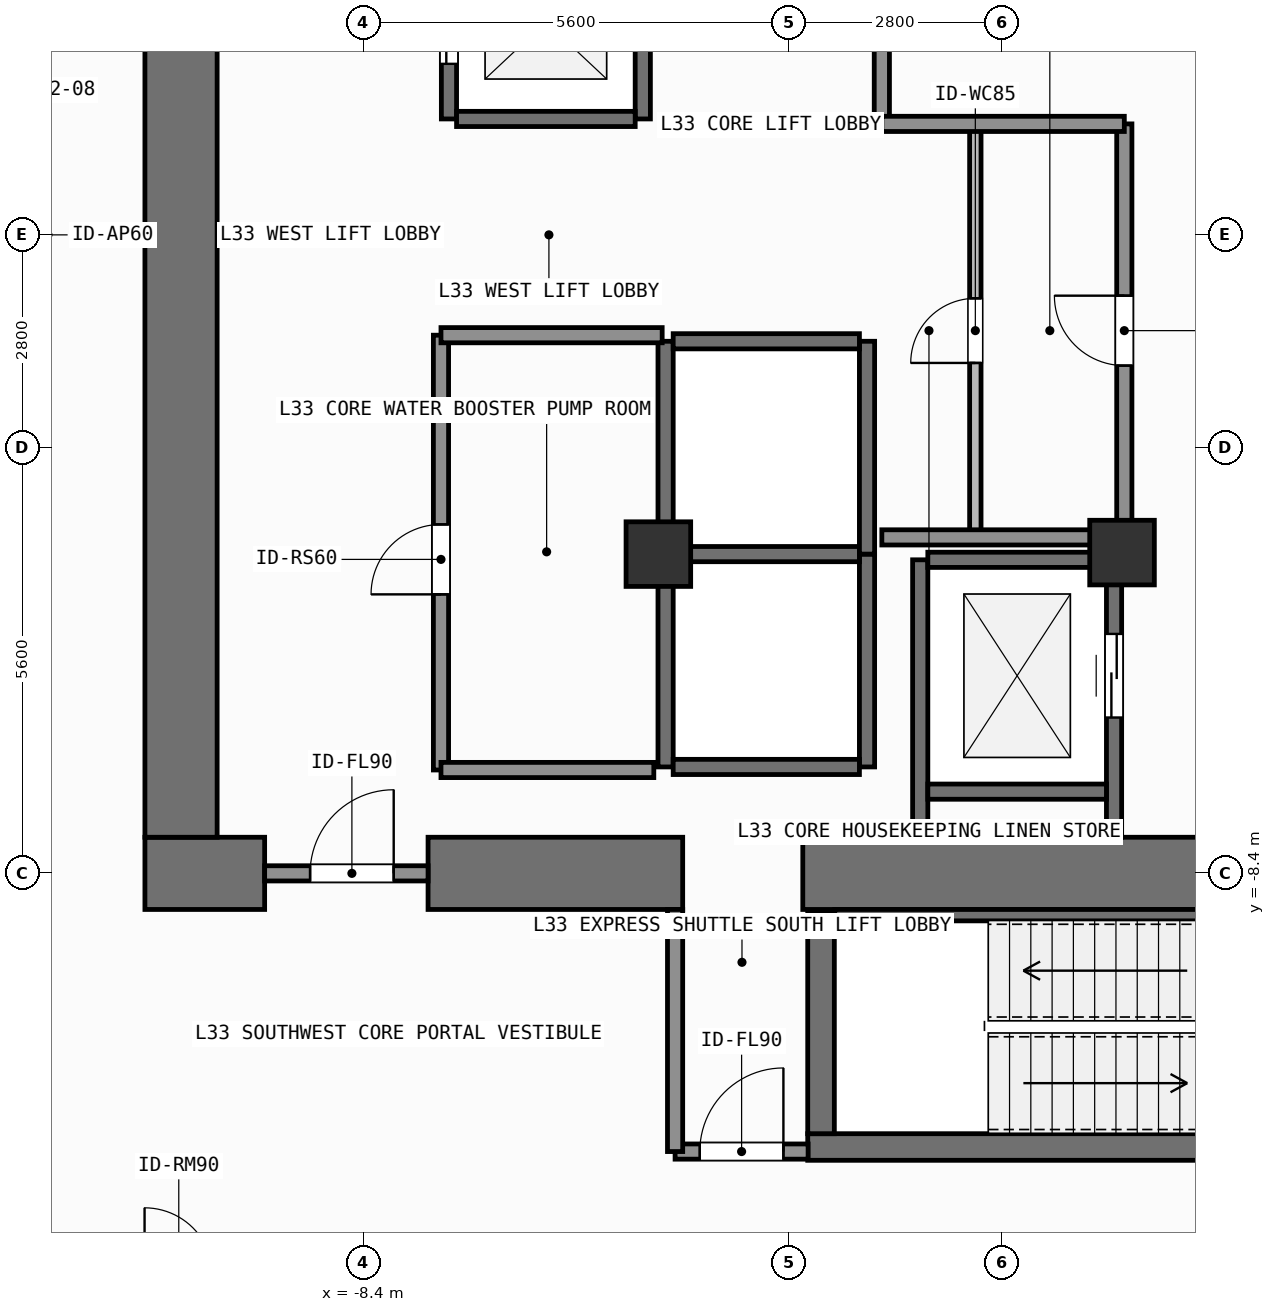
"""IFC4 building model, lengths in metres.
Left out: names, types, materials, properties, quantities, classifications, styles, units other than length and angle.
Written with IfcOpenShell. Run it as: python <this file> out.ifc"""

import sys

from ifc_helpers import new_model, si_unit, direction, frame, frame_2d, origin, origin_2d, place, context, subcontext, project, spatial, rectangle, extrude, element, fill, save


model = new_model("IFC4")
c1 = context("Model", 3, precision=1e-05, world=origin(), true_north=direction((0.0, 1.0)))
c2 = subcontext(c1, "Body", "Model", "MODEL_VIEW")
j1 = project(units=[si_unit("LENGTHUNIT", "METRE"), si_unit("PLANEANGLEUNIT", "RADIAN")], contexts=[c1])
p1 = place(None, origin())
s1 = spatial("IfcSite", under=j1, at=p1, CompositionType="ELEMENT")
p2 = place(p1, origin())
s2 = spatial("IfcBuilding", under=s1, at=p2, CompositionType="ELEMENT")
p3 = place(p2, frame((0.0, 0.0, 132.9)))
s3 = spatial("IfcBuildingStorey", under=s2, at=p3, CompositionType="ELEMENT", Elevation=132.9)
p4 = place(p3, frame((-11.275, -8.4, 0.0), z_axis=(0.0, 0.0, 1.0), x_axis=(1.0, 0.0, 0.0)))
e1 = element("IfcWall", 1, at=p4, inside=s3, PredefinedType="SHEAR", context=c2, shape_type="SweptSolid", body=[
    extrude(rectangle(XDim=1.575, YDim=0.95, at=frame_2d((0.788, 0.0))), origin(), (0.0, 0.0, 1.0), 3.9),
])
p5 = place(p3, frame((-7.55, -8.4, 0.0), z_axis=(0.0, 0.0, 1.0), x_axis=(1.0, 0.0, 0.0)))
e2 = element("IfcWall", 2, at=p5, inside=s3, PredefinedType="SHEAR", context=c2, shape_type="SweptSolid", body=[
    extrude(rectangle(XDim=3.35, YDim=0.95, at=frame_2d((1.675, 0.0))), origin(), (0.0, 0.0, 1.0), 3.9),
])
p6 = place(p3, frame((-2.62, -8.4, 0.0), z_axis=(0.0, 0.0, 1.0), x_axis=(1.0, 0.0, 0.0)))
e3 = element("IfcWall", 3, at=p6, inside=s3, PredefinedType="SHEAR", context=c2, shape_type="SweptSolid", body=[
    extrude(rectangle(XDim=7.27, YDim=0.95, at=frame_2d((3.635, 0.0))), origin(), (0.0, 0.0, 1.0), 3.9),
])
p7 = place(p3, frame((-10.8, -7.925, 0.0), z_axis=(0.0, 0.0, 1.0), x_axis=(0.0, 1.0, 0.0)))
e4 = element("IfcWall", 4, at=p7, inside=s3, PredefinedType="SHEAR", context=c2, shape_type="SweptSolid", body=[
    extrude(rectangle(XDim=15.85, YDim=0.95, at=frame_2d((7.925, 0.0))), origin(), (0.0, 0.0, 1.0), 3.9),
])
p8 = place(p3, frame((-2.555, -12.0, 0.0), z_axis=(0.0, 0.0, 1.0), x_axis=(1.0, 0.0, 0.0)))
e5 = element("IfcWall", 5, at=p8, inside=s3, PredefinedType="SHEAR", context=c2, shape_type="SweptSolid", body=[
    extrude(rectangle(XDim=7.31, YDim=0.35, at=frame_2d((3.655, 0.0))), origin(), (0.0, 0.0, 1.0), 3.9),
])
p9 = place(p3, frame((-2.2, -8.95, 0.0), z_axis=(0.0, 0.0, 1.0), x_axis=(1.0, 0.0, 0.0)))
e6 = element("IfcWall", 6, at=p9, inside=s3, PredefinedType="SHEAR", context=c2, shape_type="SweptSolid", body=[
    extrude(rectangle(XDim=6.6, YDim=0.15, at=frame_2d((3.3, 0.0))), origin(), (0.0, 0.0, 1.0), 3.9),
])
p10 = place(p3, frame((-2.38, -11.825, 0.0), z_axis=(0.0, 0.0, 1.0), x_axis=(0.0, 1.0, 0.0)))
e7 = element("IfcWall", 7, at=p10, inside=s3, PredefinedType="SHEAR", context=c2, shape_type="SweptSolid", body=[
    extrude(rectangle(XDim=2.925, YDim=0.35, at=frame_2d((1.462, 0.0))), origin(), (0.0, 0.0, 1.0), 3.9),
])
for number, where, z_axis, x_axis in (
    (8, (-4.52, -4.2, 0.0), (0.0, 0.0, 1.0), (1.0, 0.0, 0.0)),
    (9, (1.58, -4.18, 0.0), (0.0, 0.0, 1.0), (1.0, 0.0, 0.0)),
):
    element("IfcColumn", number, at=place(p3, frame(where, z_axis=z_axis, x_axis=x_axis)), inside=s3, PredefinedType="COLUMN", context=c2, shape_type="SweptSolid", body=[
        extrude(rectangle(XDim=0.85, YDim=0.85, at=origin_2d()), origin(), (0.0, 0.0, 1.0), 3.9),
    ])
p11 = place(p3, frame((-7.275, 1.525, 0.0), z_axis=(0.0, 0.0, 1.0), x_axis=(0.0, 1.0, 0.0)))
e10 = element("IfcWall", 10, at=p11, inside=s3, PredefinedType="SHEAR", context=c2, shape_type="SweptSolid", body=[
    extrude(rectangle(XDim=2.55, YDim=0.2, at=frame_2d((1.275, 0.0))), origin(), (0.0, 0.0, 1.0), 3.62),
])
p12 = place(p11, frame((0.725, 0.0, 0.0)))
e11 = element("IfcOpeningElement", 11, at=p12, cuts=e10, PredefinedType="OPENING", context=c2, shape_type="SweptSolid", body=[
    extrude(rectangle(XDim=1.1, YDim=2.2, at=frame_2d((0.55, 1.1))), frame((0.0, 0.11, 0.0), z_axis=(0.0, -1.0, 0.0), x_axis=(1.0, 0.0, 0.0)), (0.0, 0.0, 1.0), 0.22),
])
p13 = place(p3, frame((-4.725, 1.525, 0.0), z_axis=(0.0, 0.0, 1.0), x_axis=(0.0, 1.0, 0.0)))
e12 = element("IfcWall", 12, at=p13, inside=s3, PredefinedType="SHEAR", context=c2, shape_type="SweptSolid", body=[
    extrude(rectangle(XDim=2.55, YDim=0.2, at=frame_2d((1.275, 0.0))), origin(), (0.0, 0.0, 1.0), 3.62),
])
p14 = place(p3, frame((-7.175, 1.525, 0.0), z_axis=(0.0, 0.0, 1.0), x_axis=(1.0, 0.0, 0.0)))
e13 = element("IfcWall", 13, at=p14, inside=s3, PredefinedType="SHEAR", context=c2, shape_type="SweptSolid", body=[
    extrude(rectangle(XDim=2.35, YDim=0.2, at=frame_2d((1.175, 0.0))), origin(), (0.0, 0.0, 1.0), 3.62),
])
for number, where, z_axis, x_axis in (
    (14, (-4.425, -7.0, 0.0), (0.0, 0.0, 1.0), (0.0, 1.0, 0.0)),
    (15, (-1.775, -7.0, 0.0), (0.0, 0.0, 1.0), (0.0, 1.0, 0.0)),
):
    element("IfcWall", number, at=place(p3, frame(where, z_axis=z_axis, x_axis=x_axis)), inside=s3, PredefinedType="SHEAR", context=c2, shape_type="SweptSolid", body=[
        extrude(rectangle(XDim=2.8, YDim=0.2, at=frame_2d((1.4, 0.0))), origin(), (0.0, 0.0, 1.0), 3.62),
    ])
for number, where, z_axis, x_axis in (
    (16, (-4.325, -7.0, 0.0), (0.0, 0.0, 1.0), (1.0, 0.0, 0.0)),
    (17, (-4.325, -4.2, 0.0), (0.0, 0.0, 1.0), (1.0, 0.0, 0.0)),
):
    element("IfcWall", number, at=place(p3, frame(where, z_axis=z_axis, x_axis=x_axis)), inside=s3, PredefinedType="SHEAR", context=c2, shape_type="SweptSolid", body=[
        extrude(rectangle(XDim=2.45, YDim=0.2, at=frame_2d((1.225, 0.0))), origin(), (0.0, 0.0, 1.0), 3.62),
    ])
for number, where, z_axis, x_axis in (
    (18, (-4.425, -4.2, 0.0), (0.0, 0.0, 1.0), (0.0, 1.0, 0.0)),
    (19, (-1.775, -4.2, 0.0), (0.0, 0.0, 1.0), (0.0, 1.0, 0.0)),
):
    element("IfcWall", number, at=place(p3, frame(where, z_axis=z_axis, x_axis=x_axis)), inside=s3, PredefinedType="SHEAR", context=c2, shape_type="SweptSolid", body=[
        extrude(rectangle(XDim=2.8, YDim=0.2, at=frame_2d((1.4, 0.0))), origin(), (0.0, 0.0, 1.0), 3.62),
    ])
p15 = place(p3, frame((-4.325, -1.4, 0.0), z_axis=(0.0, 0.0, 1.0), x_axis=(1.0, 0.0, 0.0)))
e20 = element("IfcWall", 20, at=p15, inside=s3, PredefinedType="SHEAR", context=c2, shape_type="SweptSolid", body=[
    extrude(rectangle(XDim=2.45, YDim=0.2, at=frame_2d((1.225, 0.0))), origin(), (0.0, 0.0, 1.0), 3.62),
])
p16 = place(p3, frame((-1.075, -7.925, 0.0), z_axis=(0.0, 0.0, 1.0), x_axis=(0.0, 1.0, 0.0)))
e21 = element("IfcWall", 21, at=p16, inside=s3, PredefinedType="SHEAR", context=c2, shape_type="SweptSolid", body=[
    extrude(rectangle(XDim=3.65, YDim=0.2, at=frame_2d((1.825, 0.0))), origin(), (0.0, 0.0, 1.0), 3.62),
])
p17 = place(p3, frame((1.475, -7.925, 0.0), z_axis=(0.0, 0.0, 1.0), x_axis=(0.0, 1.0, 0.0)))
e22 = element("IfcWall", 22, at=p17, inside=s3, PredefinedType="SHEAR", context=c2, shape_type="SweptSolid", body=[
    extrude(rectangle(XDim=3.65, YDim=0.2, at=frame_2d((1.825, 0.0))), origin(), (0.0, 0.0, 1.0), 3.62),
])
p18 = place(p17, frame((1.575, 0.0, 0.0)))
e23 = element("IfcOpeningElement", 23, at=p18, cuts=e22, PredefinedType="OPENING", context=c2, shape_type="SweptSolid", body=[
    extrude(rectangle(XDim=1.1, YDim=2.2, at=frame_2d((0.55, 1.1))), frame((0.0, 0.11, 0.0), z_axis=(0.0, -1.0, 0.0), x_axis=(1.0, 0.0, 0.0)), (0.0, 0.0, 1.0), 0.22),
])
for number, where, z_axis, x_axis in (
    (24, (-0.975, -7.325, 0.0), (0.0, 0.0, 1.0), (1.0, 0.0, 0.0)),
    (25, (-0.975, -4.275, 0.0), (0.0, 0.0, 1.0), (1.0, 0.0, 0.0)),
):
    element("IfcWall", number, at=place(p3, frame(where, z_axis=z_axis, x_axis=x_axis)), inside=s3, PredefinedType="SHEAR", context=c2, shape_type="SweptSolid", body=[
        extrude(rectangle(XDim=2.35, YDim=0.2, at=frame_2d((1.175, 0.0))), origin(), (0.0, 0.0, 1.0), 3.62),
    ])
p19 = place(p3, frame((-9.7, -8.4, 0.0), z_axis=(0.0, 0.0, 1.0), x_axis=(1.0, 0.0, 0.0)))
e26 = element("IfcWall", 26, at=p19, inside=s3, PredefinedType="SOLIDWALL", context=c2, shape_type="SweptSolid", body=[
    extrude(rectangle(XDim=2.15, YDim=0.2, at=frame_2d((1.075, 0.0))), origin(), (0.0, 0.0, 1.0), 2.66),
])
p20 = place(p19, frame((0.598, 0.0, 0.0)))
e27 = element("IfcOpeningElement", 27, at=p20, cuts=e26, PredefinedType="OPENING", context=c2, shape_type="SweptSolid", body=[
    extrude(rectangle(XDim=1.1, YDim=2.15, at=frame_2d((0.55, 1.075))), frame((0.0, 0.11, 0.0), z_axis=(0.0, -1.0, 0.0), x_axis=(1.0, 0.0, 0.0)), (0.0, 0.0, 1.0), 0.22),
])
p21 = place(p3, frame((-4.3, -12.06, 0.0), z_axis=(0.0, 0.0, 1.0), x_axis=(1.0, 0.0, 0.0)))
e28 = element("IfcWall", 28, at=p21, inside=s3, PredefinedType="SOLIDWALL", context=c2, shape_type="SweptSolid", body=[
    extrude(rectangle(XDim=1.75, YDim=0.2, at=frame_2d((0.875, 0.0))), origin(), (0.0, 0.0, 1.0), 3.62),
])
p22 = place(p21, frame((0.325, 0.0, 0.0)))
e29 = element("IfcOpeningElement", 29, at=p22, cuts=e28, PredefinedType="OPENING", context=c2, shape_type="SweptSolid", body=[
    extrude(rectangle(XDim=1.1, YDim=2.15, at=frame_2d((0.55, 1.075))), frame((0.0, 0.11, 0.0), z_axis=(0.0, -1.0, 0.0), x_axis=(1.0, 0.0, 0.0)), (0.0, 0.0, 1.0), 0.22),
])
p23 = place(p3, frame((-0.35, -3.98, 0.0), z_axis=(0.0, 0.0, 1.0), x_axis=(0.0, 1.0, 0.0)))
e30 = element("IfcWall", 30, at=p23, inside=s3, PredefinedType="PARTITIONING", context=c2, shape_type="SweptSolid", body=[
    extrude(rectangle(XDim=5.44, YDim=0.15, at=frame_2d((2.72, 0.0))), origin(), (0.0, 0.0, 1.0), 3.62),
])
p24 = place(p23, frame((2.295, 0.0, 0.0)))
e31 = element("IfcOpeningElement", 31, at=p24, cuts=e30, PredefinedType="OPENING", context=c2, shape_type="SweptSolid", body=[
    extrude(rectangle(XDim=0.85, YDim=2.1, at=frame_2d((0.425, 1.05))), frame((0.0, 0.085, 0.0), z_axis=(0.0, -1.0, 0.0), x_axis=(1.0, 0.0, 0.0)), (0.0, 0.0, 1.0), 0.17),
])
p25 = place(p3, frame((1.61, -3.98, 0.0), z_axis=(0.0, 0.0, 1.0), x_axis=(0.0, 1.0, 0.0)))
e32 = element("IfcWall", 32, at=p25, inside=s3, PredefinedType="SOLIDWALL", context=c2, shape_type="SweptSolid", body=[
    extrude(rectangle(XDim=5.44, YDim=0.2, at=frame_2d((2.72, 0.0))), origin(), (0.0, 0.0, 1.0), 3.62),
])
p26 = place(p25, frame((2.26, 0.0, 0.0)))
e33 = element("IfcOpeningElement", 33, at=p26, cuts=e32, PredefinedType="OPENING", context=c2, shape_type="SweptSolid", body=[
    extrude(rectangle(XDim=0.92, YDim=2.1, at=frame_2d((0.46, 1.05))), frame((0.0, 0.11, 0.0), z_axis=(0.0, -1.0, 0.0), x_axis=(1.0, 0.0, 0.0)), (0.0, 0.0, 1.0), 0.22),
])
p27 = place(p3, frame((-7.38, -7.04, 0.0), z_axis=(0.0, 0.0, 1.0), x_axis=(0.0, 1.0, 0.0)))
e34 = element("IfcWall", 34, at=p27, inside=s3, PredefinedType="SOLIDWALL", context=c2, shape_type="SweptSolid", body=[
    extrude(rectangle(XDim=5.72, YDim=0.2, at=frame_2d((2.86, 0.0))), origin(), (0.0, 0.0, 1.0), 3.62),
])
p28 = place(p27, frame((2.31, 0.0, 0.0)))
e35 = element("IfcOpeningElement", 35, at=p28, cuts=e34, PredefinedType="OPENING", context=c2, shape_type="SweptSolid", body=[
    extrude(rectangle(XDim=0.92, YDim=2.1, at=frame_2d((0.46, 1.05))), frame((0.0, 0.11, 0.0), z_axis=(0.0, -1.0, 0.0), x_axis=(1.0, 0.0, 0.0)), (0.0, 0.0, 1.0), 0.22),
])
p29 = place(p3, frame((-4.3, -12.06, 0.0), z_axis=(0.0, 0.0, 1.0), x_axis=(0.0, 1.0, 0.0)))
e36 = element("IfcWall", 36, at=p29, inside=s3, PredefinedType="SOLIDWALL", context=c2, shape_type="SweptSolid", body=[
    extrude(rectangle(XDim=3.185, YDim=0.2, at=frame_2d((1.593, 0.0))), origin(), (0.0, 0.0, 1.0), 3.62),
])
p30 = place(p3, frame((-7.38, -1.32, 0.0), z_axis=(0.0, 0.0, 1.0), x_axis=(1.0, 0.0, 0.0)))
e37 = element("IfcWall", 37, at=p30, inside=s3, PredefinedType="SOLIDWALL", context=c2, shape_type="SweptSolid", body=[
    extrude(rectangle(XDim=2.91, YDim=0.2, at=frame_2d((1.455, 0.0))), origin(), (0.0, 0.0, 1.0), 3.62),
])
p31 = place(p3, frame((-1.58, 1.48, 0.0), z_axis=(0.0, 0.0, 1.0), x_axis=(0.0, 1.0, 0.0)))
e38 = element("IfcWall", 38, at=p31, inside=s3, PredefinedType="SOLIDWALL", context=c2, shape_type="SweptSolid", body=[
    extrude(rectangle(XDim=2.7, YDim=0.2, at=frame_2d((1.35, 0.0))), origin(), (0.0, 0.0, 1.0), 3.62),
])
for number, where, z_axis, x_axis in (
    (39, (-1.58, -3.98, 0.0), (0.0, 0.0, 1.0), (1.0, 0.0, 0.0)),
    (40, (-1.58, 1.46, 0.0), (0.0, 0.0, 1.0), (1.0, 0.0, 0.0)),
):
    element("IfcWall", number, at=place(p3, frame(where, z_axis=z_axis, x_axis=x_axis)), inside=s3, PredefinedType="SOLIDWALL", context=c2, shape_type="SweptSolid", body=[
        extrude(rectangle(XDim=3.19, YDim=0.2, at=frame_2d((1.595, 0.0))), origin(), (0.0, 0.0, 1.0), 3.62),
    ])
p32 = place(p3, frame((-7.38, -7.04, 0.0), z_axis=(0.0, 0.0, 1.0), x_axis=(1.0, 0.0, 0.0)))
e41 = element("IfcWall", 41, at=p32, inside=s3, PredefinedType="SOLIDWALL", context=c2, shape_type="SweptSolid", body=[
    extrude(rectangle(XDim=2.8, YDim=0.2, at=frame_2d((1.4, 0.0))), origin(), (0.0, 0.0, 1.0), 3.62),
])
p33 = place(p12, origin())
e42 = element("IfcDoor", 42, at=p33, inside=s3, OperationType="SLIDING_TO_LEFT", PredefinedType="DOOR", context=c2, shape_type="SweptSolid", body=[
    extrude(rectangle(XDim=1.1, YDim=2.2, at=frame_2d((0.55, 1.1))), frame((0.0, 0.025, 0.0), z_axis=(0.0, -1.0, 0.0), x_axis=(1.0, 0.0, 0.0)), (0.0, 0.0, 1.0), 0.05),
])
fill(e11, e42)
p34 = place(p18, origin())
e43 = element("IfcDoor", 43, at=p34, inside=s3, OperationType="SLIDING_TO_LEFT", PredefinedType="DOOR", context=c2, shape_type="SweptSolid", body=[
    extrude(rectangle(XDim=1.1, YDim=2.2, at=frame_2d((0.55, 1.1))), frame((0.0, 0.025, 0.0), z_axis=(0.0, -1.0, 0.0), x_axis=(1.0, 0.0, 0.0)), (0.0, 0.0, 1.0), 0.05),
])
fill(e23, e43)
p35 = place(p20, origin())
e44 = element("IfcDoor", 44, at=p35, inside=s3, OperationType="SINGLE_SWING_RIGHT", PredefinedType="DOOR", context=c2, shape_type="SweptSolid", body=[
    extrude(rectangle(XDim=1.1, YDim=2.15, at=frame_2d((0.55, 1.075))), frame((0.0, 0.025, 0.0), z_axis=(0.0, -1.0, 0.0), x_axis=(1.0, 0.0, 0.0)), (0.0, 0.0, 1.0), 0.05),
])
fill(e27, e44)
p36 = place(p22, origin())
e45 = element("IfcDoor", 45, at=p36, inside=s3, OperationType="SINGLE_SWING_RIGHT", PredefinedType="DOOR", context=c2, shape_type="SweptSolid", body=[
    extrude(rectangle(XDim=1.1, YDim=2.15, at=frame_2d((0.55, 1.075))), frame((0.0, 0.025, 0.0), z_axis=(0.0, -1.0, 0.0), x_axis=(1.0, 0.0, 0.0)), (0.0, 0.0, 1.0), 0.05),
])
fill(e29, e45)
p37 = place(p24, origin())
e46 = element("IfcDoor", 46, at=p37, inside=s3, OperationType="SINGLE_SWING_LEFT", PredefinedType="DOOR", context=c2, shape_type="SweptSolid", body=[
    extrude(rectangle(XDim=0.85, YDim=2.1, at=frame_2d((0.425, 1.05))), frame((0.0, 0.025, 0.0), z_axis=(0.0, -1.0, 0.0), x_axis=(1.0, 0.0, 0.0)), (0.0, 0.0, 1.0), 0.05),
])
fill(e31, e46)
p38 = place(p26, origin())
e47 = element("IfcDoor", 47, at=p38, inside=s3, OperationType="SINGLE_SWING_RIGHT", PredefinedType="DOOR", context=c2, shape_type="SweptSolid", body=[
    extrude(rectangle(XDim=0.92, YDim=2.1, at=frame_2d((0.46, 1.05))), frame((0.0, 0.025, 0.0), z_axis=(0.0, -1.0, 0.0), x_axis=(1.0, 0.0, 0.0)), (0.0, 0.0, 1.0), 0.05),
])
fill(e33, e47)
p39 = place(p28, origin())
e48 = element("IfcDoor", 48, at=p39, inside=s3, OperationType="SINGLE_SWING_LEFT", PredefinedType="DOOR", context=c2, shape_type="SweptSolid", body=[
    extrude(rectangle(XDim=0.92, YDim=2.1, at=frame_2d((0.46, 1.05))), frame((0.0, 0.025, 0.0), z_axis=(0.0, -1.0, 0.0), x_axis=(1.0, 0.0, 0.0)), (0.0, 0.0, 1.0), 0.05),
])
fill(e35, e48)
save(model, sys.argv[1])
